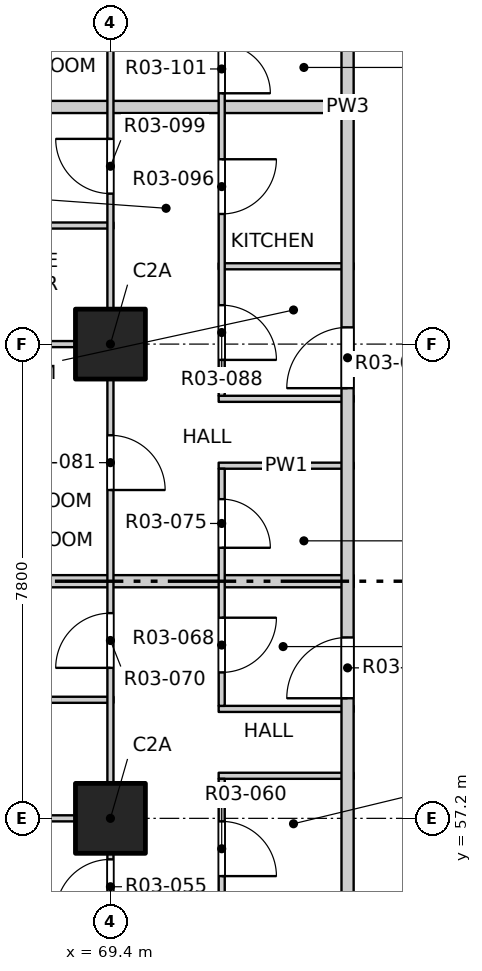
"""IFC4 building model, lengths in metres.
Left out: names, types, materials, properties, quantities, classifications, styles, units other than length and angle.
Written with IfcOpenShell. Run it as: python <this file> out.ifc"""

import sys

from ifc_helpers import new_model, si_unit, direction, frame, frame_2d, origin, origin_2d, place, context, subcontext, project, spatial, rectangle, extrude, element, fill, save


model = new_model("IFC4")
c1 = context("Model", 3, precision=1e-05, world=origin(), true_north=direction((0.0, 1.0)))
c2 = subcontext(c1, "Body", "Model", "MODEL_VIEW")
j1 = project(units=[si_unit("LENGTHUNIT", "METRE"), si_unit("PLANEANGLEUNIT", "RADIAN")], contexts=[c1])
p1 = place(None, origin())
s1 = spatial("IfcSite", under=j1, at=p1, CompositionType="ELEMENT")
p2 = place(p1, origin())
s2 = spatial("IfcBuilding", under=s1, at=p2, CompositionType="ELEMENT")
p3 = place(p2, frame((0.0, 0.0, 43.3)))
s3 = spatial("IfcBuildingStorey", under=s2, at=p3, CompositionType="ELEMENT", Elevation=43.3)
for number, where, z_axis, x_axis in (
    (1, (69.4, 57.2, -0.25), (0.0, 0.0, 1.0), (1.0, 0.0, 0.0)),
    (2, (69.4, 65.0, -0.25), (0.0, 0.0, 1.0), (1.0, 0.0, 0.0)),
):
    element("IfcColumn", number, at=place(p3, frame(where, z_axis=z_axis, x_axis=x_axis)), inside=s3, PredefinedType="COLUMN", context=c2, shape_type="SweptSolid", body=[
        extrude(rectangle(XDim=1.15, YDim=1.15, at=origin_2d()), origin(), (0.0, 0.0, 1.0), 3.35),
    ])
p4 = place(p3, frame((61.9, 57.2, 0.0), z_axis=(0.0, 0.0, 1.0), x_axis=(1.0, 0.0, 0.0)))
e3 = element("IfcWall", 3, at=p4, inside=s3, PredefinedType="PARTITIONING", context=c2, shape_type="SweptSolid", body=[
    extrude(rectangle(XDim=7.55, YDim=0.1, at=frame_2d((3.775, 0.0))), origin(), (0.0, 0.0, 1.0), 3.1),
])
for number, where, z_axis, x_axis in (
    (4, (71.18, 57.9, 0.0), (0.0, 0.0, 1.0), (1.0, 0.0, 0.0)),
    (5, (71.18, 59.0, 0.0), (0.0, 0.0, 1.0), (1.0, 0.0, 0.0)),
):
    element("IfcWall", number, at=place(p3, frame(where, z_axis=z_axis, x_axis=x_axis)), inside=s3, PredefinedType="PARTITIONING", context=c2, shape_type="SweptSolid", body=[
        extrude(rectangle(XDim=2.22, YDim=0.1, at=frame_2d((1.11, 0.0))), origin(), (0.0, 0.0, 1.0), 3.1),
    ])
p5 = place(p3, frame((65.75, 59.15, 0.0), z_axis=(0.0, 0.0, 1.0), x_axis=(1.0, 0.0, 0.0)))
e6 = element("IfcWall", 6, at=p5, inside=s3, PredefinedType="PARTITIONING", context=c2, shape_type="SweptSolid", body=[
    extrude(rectangle(XDim=3.7, YDim=0.1, at=frame_2d((1.85, 0.0))), origin(), (0.0, 0.0, 1.0), 3.1),
])
p6 = place(p3, frame((61.9, 61.1, 0.0), z_axis=(0.0, 0.0, 1.0), x_axis=(1.0, 0.0, 0.0)))
e7 = element("IfcWall", 7, at=p6, inside=s3, PredefinedType="PARTITIONING", context=c2, shape_type="SweptSolid", body=[
    extrude(rectangle(XDim=11.5, YDim=0.2, at=frame_2d((5.75, 0.0))), origin(), (0.0, 0.0, 1.0), 3.1),
])
for number, where, z_axis, x_axis in (
    (8, (71.18, 63.0, 0.0), (0.0, 0.0, 1.0), (1.0, 0.0, 0.0)),
    (9, (71.18, 64.1, 0.0), (0.0, 0.0, 1.0), (1.0, 0.0, 0.0)),
):
    element("IfcWall", number, at=place(p3, frame(where, z_axis=z_axis, x_axis=x_axis)), inside=s3, PredefinedType="PARTITIONING", context=c2, shape_type="SweptSolid", body=[
        extrude(rectangle(XDim=2.22, YDim=0.1, at=frame_2d((1.11, 0.0))), origin(), (0.0, 0.0, 1.0), 3.1),
    ])
p7 = place(p3, frame((61.9, 65.0, 0.0), z_axis=(0.0, 0.0, 1.0), x_axis=(1.0, 0.0, 0.0)))
e10 = element("IfcWall", 10, at=p7, inside=s3, PredefinedType="PARTITIONING", context=c2, shape_type="SweptSolid", body=[
    extrude(rectangle(XDim=7.55, YDim=0.1, at=frame_2d((3.775, 0.0))), origin(), (0.0, 0.0, 1.0), 3.1),
])
p8 = place(p3, frame((71.18, 66.28, 0.0), z_axis=(0.0, 0.0, 1.0), x_axis=(1.0, 0.0, 0.0)))
e11 = element("IfcWall", 11, at=p8, inside=s3, PredefinedType="PARTITIONING", context=c2, shape_type="SweptSolid", body=[
    extrude(rectangle(XDim=2.22, YDim=0.1, at=frame_2d((1.11, 0.0))), origin(), (0.0, 0.0, 1.0), 3.1),
])
p9 = place(p3, frame((65.9, 66.95, 0.0), z_axis=(0.0, 0.0, 1.0), x_axis=(1.0, 0.0, 0.0)))
e12 = element("IfcWall", 12, at=p9, inside=s3, PredefinedType="PARTITIONING", context=c2, shape_type="SweptSolid", body=[
    extrude(rectangle(XDim=3.55, YDim=0.1, at=frame_2d((1.775, 0.0))), origin(), (0.0, 0.0, 1.0), 3.1),
])
p10 = place(p3, frame((61.9, 68.9, 0.0), z_axis=(0.0, 0.0, 1.0), x_axis=(1.0, 0.0, 0.0)))
e13 = element("IfcWall", 13, at=p10, inside=s3, PredefinedType="PARTITIONING", context=c2, shape_type="SweptSolid", body=[
    extrude(rectangle(XDim=11.5, YDim=0.2, at=frame_2d((5.75, 0.0))), origin(), (0.0, 0.0, 1.0), 3.1),
])
p11 = place(p3, frame((69.4, 41.9, 0.0), z_axis=(0.0, 0.0, 1.0), x_axis=(0.0, 1.0, 0.0)))
e14 = element("IfcWall", 14, at=p11, inside=s3, PredefinedType="PARTITIONING", context=c2, shape_type="SweptSolid", body=[
    extrude(rectangle(XDim=46.2, YDim=0.1, at=frame_2d((23.1, 0.0))), origin(), (0.0, 0.0, 1.0), 3.1),
])
p12 = place(p11, frame((1.2, 0.0, 0.0)))
e15 = element("IfcOpeningElement", 15, at=p12, cuts=e14, PredefinedType="OPENING", context=c2, shape_type="SweptSolid", body=[
    extrude(rectangle(XDim=0.9, YDim=2.1, at=frame_2d((0.45, 1.05))), frame((0.0, 0.06, 0.0), z_axis=(0.0, -1.0, 0.0), x_axis=(1.0, 0.0, 0.0)), (0.0, 0.0, 1.0), 0.12),
])
p13 = place(p11, frame((5.9, 0.0, 0.0)))
e16 = element("IfcOpeningElement", 16, at=p13, cuts=e14, PredefinedType="OPENING", context=c2, shape_type="SweptSolid", body=[
    extrude(rectangle(XDim=0.9, YDim=2.1, at=frame_2d((0.45, 1.05))), frame((0.0, 0.06, 0.0), z_axis=(0.0, -1.0, 0.0), x_axis=(1.0, 0.0, 0.0)), (0.0, 0.0, 1.0), 0.12),
])
p14 = place(p11, frame((9.0, 0.0, 0.0)))
e17 = element("IfcOpeningElement", 17, at=p14, cuts=e14, PredefinedType="OPENING", context=c2, shape_type="SweptSolid", body=[
    extrude(rectangle(XDim=0.9, YDim=2.1, at=frame_2d((0.45, 1.05))), frame((0.0, 0.06, 0.0), z_axis=(0.0, -1.0, 0.0), x_axis=(1.0, 0.0, 0.0)), (0.0, 0.0, 1.0), 0.12),
])
p15 = place(p11, frame((13.725, 0.0, 0.0)))
e18 = element("IfcOpeningElement", 18, at=p15, cuts=e14, PredefinedType="OPENING", context=c2, shape_type="SweptSolid", body=[
    extrude(rectangle(XDim=0.9, YDim=2.1, at=frame_2d((0.45, 1.05))), frame((0.0, 0.06, 0.0), z_axis=(0.0, -1.0, 0.0), x_axis=(1.0, 0.0, 0.0)), (0.0, 0.0, 1.0), 0.12),
])
p16 = place(p11, frame((17.775, 0.0, 0.0)))
e19 = element("IfcOpeningElement", 19, at=p16, cuts=e14, PredefinedType="OPENING", context=c2, shape_type="SweptSolid", body=[
    extrude(rectangle(XDim=0.9, YDim=2.1, at=frame_2d((0.45, 1.05))), frame((0.0, 0.06, 0.0), z_axis=(0.0, -1.0, 0.0), x_axis=(1.0, 0.0, 0.0)), (0.0, 0.0, 1.0), 0.12),
])
p17 = place(p11, frame((20.7, 0.0, 0.0)))
e20 = element("IfcOpeningElement", 20, at=p17, cuts=e14, PredefinedType="OPENING", context=c2, shape_type="SweptSolid", body=[
    extrude(rectangle(XDim=0.9, YDim=2.1, at=frame_2d((0.45, 1.05))), frame((0.0, 0.06, 0.0), z_axis=(0.0, -1.0, 0.0), x_axis=(1.0, 0.0, 0.0)), (0.0, 0.0, 1.0), 0.12),
])
p18 = place(p11, frame((25.575, 0.0, 0.0)))
e21 = element("IfcOpeningElement", 21, at=p18, cuts=e14, PredefinedType="OPENING", context=c2, shape_type="SweptSolid", body=[
    extrude(rectangle(XDim=0.9, YDim=2.1, at=frame_2d((0.45, 1.05))), frame((0.0, 0.06, 0.0), z_axis=(0.0, -1.0, 0.0), x_axis=(1.0, 0.0, 0.0)), (0.0, 0.0, 1.0), 0.12),
])
p19 = place(p11, frame((28.5, 0.0, 0.0)))
e22 = element("IfcOpeningElement", 22, at=p19, cuts=e14, PredefinedType="OPENING", context=c2, shape_type="SweptSolid", body=[
    extrude(rectangle(XDim=0.9, YDim=2.1, at=frame_2d((0.45, 1.05))), frame((0.0, 0.06, 0.0), z_axis=(0.0, -1.0, 0.0), x_axis=(1.0, 0.0, 0.0)), (0.0, 0.0, 1.0), 0.12),
])
p20 = place(p11, frame((33.375, 0.0, 0.0)))
e23 = element("IfcOpeningElement", 23, at=p20, cuts=e14, PredefinedType="OPENING", context=c2, shape_type="SweptSolid", body=[
    extrude(rectangle(XDim=0.9, YDim=2.1, at=frame_2d((0.45, 1.05))), frame((0.0, 0.06, 0.0), z_axis=(0.0, -1.0, 0.0), x_axis=(1.0, 0.0, 0.0)), (0.0, 0.0, 1.0), 0.12),
])
p21 = place(p11, frame((36.3, 0.0, 0.0)))
e24 = element("IfcOpeningElement", 24, at=p21, cuts=e14, PredefinedType="OPENING", context=c2, shape_type="SweptSolid", body=[
    extrude(rectangle(XDim=0.9, YDim=2.1, at=frame_2d((0.45, 1.05))), frame((0.0, 0.06, 0.0), z_axis=(0.0, -1.0, 0.0), x_axis=(1.0, 0.0, 0.0)), (0.0, 0.0, 1.0), 0.12),
])
p22 = place(p11, frame((40.2, 0.0, 0.0)))
e25 = element("IfcOpeningElement", 25, at=p22, cuts=e14, PredefinedType="OPENING", context=c2, shape_type="SweptSolid", body=[
    extrude(rectangle(XDim=0.9, YDim=2.1, at=frame_2d((0.45, 1.05))), frame((0.0, 0.06, 0.0), z_axis=(0.0, -1.0, 0.0), x_axis=(1.0, 0.0, 0.0)), (0.0, 0.0, 1.0), 0.12),
])
p23 = place(p11, frame((44.1, 0.0, 0.0)))
e26 = element("IfcOpeningElement", 26, at=p23, cuts=e14, PredefinedType="OPENING", context=c2, shape_type="SweptSolid", body=[
    extrude(rectangle(XDim=0.9, YDim=2.1, at=frame_2d((0.45, 1.05))), frame((0.0, 0.06, 0.0), z_axis=(0.0, -1.0, 0.0), x_axis=(1.0, 0.0, 0.0)), (0.0, 0.0, 1.0), 0.12),
])
p24 = place(p3, frame((71.23, 45.55, 0.0), z_axis=(0.0, 0.0, 1.0), x_axis=(0.0, 1.0, 0.0)))
e27 = element("IfcWall", 27, at=p24, inside=s3, PredefinedType="PARTITIONING", context=c2, shape_type="SweptSolid", body=[
    extrude(rectangle(XDim=12.3, YDim=0.1, at=frame_2d((6.15, 0.0))), origin(), (0.0, 0.0, 1.0), 3.1),
])
p25 = place(p24, frame((1.0, 0.0, 0.0)))
e28 = element("IfcOpeningElement", 28, at=p25, cuts=e27, PredefinedType="OPENING", context=c2, shape_type="SweptSolid", body=[
    extrude(rectangle(XDim=0.8, YDim=2.1, at=frame_2d((0.4, 1.05))), frame((0.0, 0.06, 0.0), z_axis=(0.0, -1.0, 0.0), x_axis=(1.0, 0.0, 0.0)), (0.0, 0.0, 1.0), 0.12),
])
p26 = place(p24, frame((3.35, 0.0, 0.0)))
e29 = element("IfcOpeningElement", 29, at=p26, cuts=e27, PredefinedType="OPENING", context=c2, shape_type="SweptSolid", body=[
    extrude(rectangle(XDim=0.9, YDim=2.1, at=frame_2d((0.45, 1.05))), frame((0.0, 0.06, 0.0), z_axis=(0.0, -1.0, 0.0), x_axis=(1.0, 0.0, 0.0)), (0.0, 0.0, 1.0), 0.12),
])
p27 = place(p24, frame((5.8, 0.0, 0.0)))
e30 = element("IfcOpeningElement", 30, at=p27, cuts=e27, PredefinedType="OPENING", context=c2, shape_type="SweptSolid", body=[
    extrude(rectangle(XDim=0.8, YDim=2.1, at=frame_2d((0.4, 1.05))), frame((0.0, 0.06, 0.0), z_axis=(0.0, -1.0, 0.0), x_axis=(1.0, 0.0, 0.0)), (0.0, 0.0, 1.0), 0.12),
])
p28 = place(p24, frame((8.4, 0.0, 0.0)))
e31 = element("IfcOpeningElement", 31, at=p28, cuts=e27, PredefinedType="OPENING", context=c2, shape_type="SweptSolid", body=[
    extrude(rectangle(XDim=0.8, YDim=2.1, at=frame_2d((0.4, 1.05))), frame((0.0, 0.06, 0.0), z_axis=(0.0, -1.0, 0.0), x_axis=(1.0, 0.0, 0.0)), (0.0, 0.0, 1.0), 0.12),
])
p29 = place(p24, frame((10.7, 0.0, 0.0)))
e32 = element("IfcOpeningElement", 32, at=p29, cuts=e27, PredefinedType="OPENING", context=c2, shape_type="SweptSolid", body=[
    extrude(rectangle(XDim=0.9, YDim=2.1, at=frame_2d((0.45, 1.05))), frame((0.0, 0.06, 0.0), z_axis=(0.0, -1.0, 0.0), x_axis=(1.0, 0.0, 0.0)), (0.0, 0.0, 1.0), 0.12),
])
p30 = place(p3, frame((71.23, 59.05, 0.0), z_axis=(0.0, 0.0, 1.0), x_axis=(0.0, 1.0, 0.0)))
e33 = element("IfcWall", 33, at=p30, inside=s3, PredefinedType="PARTITIONING", context=c2, shape_type="SweptSolid", body=[
    extrude(rectangle(XDim=3.9, YDim=0.1, at=frame_2d((1.95, 0.0))), origin(), (0.0, 0.0, 1.0), 3.1),
])
p31 = place(p30, frame((0.55, 0.0, 0.0)))
e34 = element("IfcOpeningElement", 34, at=p31, cuts=e33, PredefinedType="OPENING", context=c2, shape_type="SweptSolid", body=[
    extrude(rectangle(XDim=0.9, YDim=2.1, at=frame_2d((0.45, 1.05))), frame((0.0, 0.06, 0.0), z_axis=(0.0, -1.0, 0.0), x_axis=(1.0, 0.0, 0.0)), (0.0, 0.0, 1.0), 0.12),
])
p32 = place(p30, frame((2.6, 0.0, 0.0)))
e35 = element("IfcOpeningElement", 35, at=p32, cuts=e33, PredefinedType="OPENING", context=c2, shape_type="SweptSolid", body=[
    extrude(rectangle(XDim=0.8, YDim=2.1, at=frame_2d((0.4, 1.05))), frame((0.0, 0.06, 0.0), z_axis=(0.0, -1.0, 0.0), x_axis=(1.0, 0.0, 0.0)), (0.0, 0.0, 1.0), 0.12),
])
p33 = place(p3, frame((71.23, 64.15, 0.0), z_axis=(0.0, 0.0, 1.0), x_axis=(0.0, 1.0, 0.0)))
e36 = element("IfcWall", 36, at=p33, inside=s3, PredefinedType="PARTITIONING", context=c2, shape_type="SweptSolid", body=[
    extrude(rectangle(XDim=5.95, YDim=0.1, at=frame_2d((2.975, 0.0))), origin(), (0.0, 0.0, 1.0), 3.1),
])
p34 = place(p33, frame((0.59, 0.0, 0.0)))
e37 = element("IfcOpeningElement", 37, at=p34, cuts=e36, PredefinedType="OPENING", context=c2, shape_type="SweptSolid", body=[
    extrude(rectangle(XDim=0.9, YDim=2.1, at=frame_2d((0.45, 1.05))), frame((0.0, 0.06, 0.0), z_axis=(0.0, -1.0, 0.0), x_axis=(1.0, 0.0, 0.0)), (0.0, 0.0, 1.0), 0.12),
])
p35 = place(p33, frame((2.99, 0.0, 0.0)))
e38 = element("IfcOpeningElement", 38, at=p35, cuts=e36, PredefinedType="OPENING", context=c2, shape_type="SweptSolid", body=[
    extrude(rectangle(XDim=0.9, YDim=2.1, at=frame_2d((0.45, 1.05))), frame((0.0, 0.06, 0.0), z_axis=(0.0, -1.0, 0.0), x_axis=(1.0, 0.0, 0.0)), (0.0, 0.0, 1.0), 0.12),
])
p36 = place(p33, frame((4.975, 0.0, 0.0)))
e39 = element("IfcOpeningElement", 39, at=p36, cuts=e36, PredefinedType="OPENING", context=c2, shape_type="SweptSolid", body=[
    extrude(rectangle(XDim=0.8, YDim=2.1, at=frame_2d((0.4, 1.05))), frame((0.0, 0.06, 0.0), z_axis=(0.0, -1.0, 0.0), x_axis=(1.0, 0.0, 0.0)), (0.0, 0.0, 1.0), 0.12),
])
p37 = place(p3, frame((73.3, 53.4, 0.0), z_axis=(0.0, 0.0, 1.0), x_axis=(0.0, 1.0, 0.0)))
e40 = element("IfcWall", 40, at=p37, inside=s3, PredefinedType="PARTITIONING", context=c2, shape_type="SweptSolid", body=[
    extrude(rectangle(XDim=31.0, YDim=0.2, at=frame_2d((15.5, 0.0))), origin(), (0.0, 0.0, 1.0), 3.1),
])
p38 = place(p37, frame((5.775, 0.0, 0.0)))
e41 = element("IfcOpeningElement", 41, at=p38, cuts=e40, PredefinedType="OPENING", context=c2, shape_type="SweptSolid", body=[
    extrude(rectangle(XDim=1.0, YDim=2.1, at=frame_2d((0.5, 1.05))), frame((0.0, 0.11, 0.0), z_axis=(0.0, -1.0, 0.0), x_axis=(1.0, 0.0, 0.0)), (0.0, 0.0, 1.0), 0.22),
])
p39 = place(p37, frame((10.875, 0.0, 0.0)))
e42 = element("IfcOpeningElement", 42, at=p39, cuts=e40, PredefinedType="OPENING", context=c2, shape_type="SweptSolid", body=[
    extrude(rectangle(XDim=1.0, YDim=2.1, at=frame_2d((0.5, 1.05))), frame((0.0, 0.11, 0.0), z_axis=(0.0, -1.0, 0.0), x_axis=(1.0, 0.0, 0.0)), (0.0, 0.0, 1.0), 0.22),
])
p40 = place(p37, frame((18.025, 0.0, 0.0)))
e43 = element("IfcOpeningElement", 43, at=p40, cuts=e40, PredefinedType="OPENING", context=c2, shape_type="SweptSolid", body=[
    extrude(rectangle(XDim=1.0, YDim=2.1, at=frame_2d((0.5, 1.05))), frame((0.0, 0.11, 0.0), z_axis=(0.0, -1.0, 0.0), x_axis=(1.0, 0.0, 0.0)), (0.0, 0.0, 1.0), 0.22),
])
p41 = place(p37, frame((27.725, 0.0, 0.0)))
e44 = element("IfcOpeningElement", 44, at=p41, cuts=e40, PredefinedType="OPENING", context=c2, shape_type="SweptSolid", body=[
    extrude(rectangle(XDim=1.0, YDim=2.1, at=frame_2d((0.5, 1.05))), frame((0.0, 0.11, 0.0), z_axis=(0.0, -1.0, 0.0), x_axis=(1.0, 0.0, 0.0)), (0.0, 0.0, 1.0), 0.22),
])
p42 = place(p15, origin())
e45 = element("IfcDoor", 45, at=p42, inside=s3, OperationType="SINGLE_SWING_LEFT", PredefinedType="DOOR", context=c2, shape_type="SweptSolid", body=[
    extrude(rectangle(XDim=0.9, YDim=2.1, at=frame_2d((0.45, 1.05))), frame((0.0, 0.025, 0.0), z_axis=(0.0, -1.0, 0.0), x_axis=(1.0, 0.0, 0.0)), (0.0, 0.0, 1.0), 0.05),
])
fill(e18, e45)
p43 = place(p29, origin())
e46 = element("IfcDoor", 46, at=p43, inside=s3, OperationType="SINGLE_SWING_RIGHT", PredefinedType="DOOR", context=c2, shape_type="SweptSolid", body=[
    extrude(rectangle(XDim=0.9, YDim=2.1, at=frame_2d((0.45, 1.05))), frame((0.0, 0.025, 0.0), z_axis=(0.0, -1.0, 0.0), x_axis=(1.0, 0.0, 0.0)), (0.0, 0.0, 1.0), 0.05),
])
fill(e32, e46)
p44 = place(p38, origin())
e47 = element("IfcDoor", 47, at=p44, inside=s3, OperationType="SINGLE_SWING_RIGHT", PredefinedType="DOOR", context=c2, shape_type="SweptSolid", body=[
    extrude(rectangle(XDim=1.0, YDim=2.1, at=frame_2d((0.5, 1.05))), frame((0.0, 0.025, 0.0), z_axis=(0.0, -1.0, 0.0), x_axis=(1.0, 0.0, 0.0)), (0.0, 0.0, 1.0), 0.05),
])
fill(e41, e47)
p45 = place(p31, origin())
e48 = element("IfcDoor", 48, at=p45, inside=s3, OperationType="SINGLE_SWING_LEFT", PredefinedType="DOOR", context=c2, shape_type="SweptSolid", body=[
    extrude(rectangle(XDim=0.9, YDim=2.1, at=frame_2d((0.45, 1.05))), frame((0.0, 0.025, 0.0), z_axis=(0.0, -1.0, 0.0), x_axis=(1.0, 0.0, 0.0)), (0.0, 0.0, 1.0), 0.05),
])
fill(e34, e48)
p46 = place(p16, origin())
e49 = element("IfcDoor", 49, at=p46, inside=s3, OperationType="SINGLE_SWING_LEFT", PredefinedType="DOOR", context=c2, shape_type="SweptSolid", body=[
    extrude(rectangle(XDim=0.9, YDim=2.1, at=frame_2d((0.45, 1.05))), frame((0.0, 0.025, 0.0), z_axis=(0.0, -1.0, 0.0), x_axis=(1.0, 0.0, 0.0)), (0.0, 0.0, 1.0), 0.05),
])
fill(e19, e49)
p47 = place(p32, origin())
e50 = element("IfcDoor", 50, at=p47, inside=s3, OperationType="SINGLE_SWING_RIGHT", PredefinedType="DOOR", context=c2, shape_type="SweptSolid", body=[
    extrude(rectangle(XDim=0.8, YDim=2.1, at=frame_2d((0.4, 1.05))), frame((0.0, 0.025, 0.0), z_axis=(0.0, -1.0, 0.0), x_axis=(1.0, 0.0, 0.0)), (0.0, 0.0, 1.0), 0.05),
])
fill(e35, e50)
p48 = place(p17, origin())
e51 = element("IfcDoor", 51, at=p48, inside=s3, OperationType="SINGLE_SWING_RIGHT", PredefinedType="DOOR", context=c2, shape_type="SweptSolid", body=[
    extrude(rectangle(XDim=0.9, YDim=2.1, at=frame_2d((0.45, 1.05))), frame((0.0, 0.025, 0.0), z_axis=(0.0, -1.0, 0.0), x_axis=(1.0, 0.0, 0.0)), (0.0, 0.0, 1.0), 0.05),
])
fill(e20, e51)
p49 = place(p39, origin())
e52 = element("IfcDoor", 52, at=p49, inside=s3, OperationType="SINGLE_SWING_RIGHT", PredefinedType="DOOR", context=c2, shape_type="SweptSolid", body=[
    extrude(rectangle(XDim=1.0, YDim=2.1, at=frame_2d((0.5, 1.05))), frame((0.0, 0.025, 0.0), z_axis=(0.0, -1.0, 0.0), x_axis=(1.0, 0.0, 0.0)), (0.0, 0.0, 1.0), 0.05),
])
fill(e42, e52)
p50 = place(p34, origin())
e53 = element("IfcDoor", 53, at=p50, inside=s3, OperationType="SINGLE_SWING_RIGHT", PredefinedType="DOOR", context=c2, shape_type="SweptSolid", body=[
    extrude(rectangle(XDim=0.9, YDim=2.1, at=frame_2d((0.45, 1.05))), frame((0.0, 0.025, 0.0), z_axis=(0.0, -1.0, 0.0), x_axis=(1.0, 0.0, 0.0)), (0.0, 0.0, 1.0), 0.05),
])
fill(e37, e53)
p51 = place(p35, origin())
e54 = element("IfcDoor", 54, at=p51, inside=s3, OperationType="SINGLE_SWING_LEFT", PredefinedType="DOOR", context=c2, shape_type="SweptSolid", body=[
    extrude(rectangle(XDim=0.9, YDim=2.1, at=frame_2d((0.45, 1.05))), frame((0.0, 0.025, 0.0), z_axis=(0.0, -1.0, 0.0), x_axis=(1.0, 0.0, 0.0)), (0.0, 0.0, 1.0), 0.05),
])
fill(e38, e54)
p52 = place(p18, origin())
e55 = element("IfcDoor", 55, at=p52, inside=s3, OperationType="SINGLE_SWING_RIGHT", PredefinedType="DOOR", context=c2, shape_type="SweptSolid", body=[
    extrude(rectangle(XDim=0.9, YDim=2.1, at=frame_2d((0.45, 1.05))), frame((0.0, 0.025, 0.0), z_axis=(0.0, -1.0, 0.0), x_axis=(1.0, 0.0, 0.0)), (0.0, 0.0, 1.0), 0.05),
])
fill(e21, e55)
p53 = place(p36, origin())
e56 = element("IfcDoor", 56, at=p53, inside=s3, OperationType="SINGLE_SWING_RIGHT", PredefinedType="DOOR", context=c2, shape_type="SweptSolid", body=[
    extrude(rectangle(XDim=0.8, YDim=2.1, at=frame_2d((0.4, 1.05))), frame((0.0, 0.025, 0.0), z_axis=(0.0, -1.0, 0.0), x_axis=(1.0, 0.0, 0.0)), (0.0, 0.0, 1.0), 0.05),
])
fill(e39, e56)
save(model, sys.argv[1])
